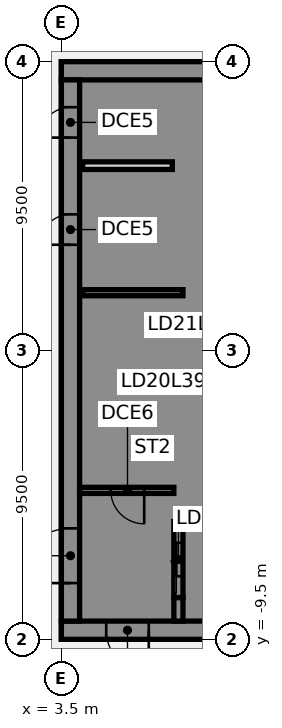
"""IFC4 building model, lengths in metres.
Left out: names, types, materials, properties, quantities, classifications, styles, units other than length and angle.
Written with IfcOpenShell. Run it as: python <this file> out.ifc"""

import sys

from ifc_helpers import new_model, si_unit, direction, frame, frame_2d, origin, place, context, subcontext, project, spatial, polyline, rectangle, outline, extrude, element, fill, save


model = new_model("IFC4")
c1 = context("Model", 3, precision=1e-05, world=origin(), true_north=direction((0.0, 1.0)))
c2 = subcontext(c1, "Body", "Model", "MODEL_VIEW")
j1 = project(units=[si_unit("LENGTHUNIT", "METRE"), si_unit("PLANEANGLEUNIT", "RADIAN")], contexts=[c1])
p1 = place(None, origin())
s1 = spatial("IfcSite", under=j1, at=p1, CompositionType="ELEMENT")
p2 = place(p1, origin())
s2 = spatial("IfcBuilding", under=s1, at=p2, CompositionType="ELEMENT")
p3 = place(p2, frame((0.0, 0.0, 159.25)))
s3 = spatial("IfcBuildingStorey", under=s2, at=p3, CompositionType="ELEMENT", Elevation=159.25)
p4 = place(p3, frame((16.5, -9.2, 0.0), z_axis=(0.0, 0.0, 1.0), x_axis=(-1.0, 0.0, 0.0)))
e1 = element("IfcWall", 1, at=p4, inside=s3, PredefinedType="SHEAR", context=c2, shape_type="SweptSolid", body=[
    extrude(rectangle(XDim=13.0, YDim=0.6, at=frame_2d((6.5, 0.0))), origin(), (0.0, 0.0, 1.0), 3.61),
])
p5 = place(p4, frame((4.15, 0.0, 0.0)))
e2 = element("IfcOpeningElement", 2, at=p5, cuts=e1, PredefinedType="OPENING", context=c2, shape_type="SweptSolid", body=[
    extrude(rectangle(XDim=1.4, YDim=2.1, at=frame_2d((0.7, 1.05))), frame((0.0, 0.31, 0.0), z_axis=(0.0, -1.0, 0.0), x_axis=(1.0, 0.0, 0.0)), (0.0, 0.0, 1.0), 0.62),
])
p6 = place(p4, frame((10.125, 0.0, 0.0)))
e3 = element("IfcOpeningElement", 3, at=p6, cuts=e1, PredefinedType="OPENING", context=c2, shape_type="SweptSolid", body=[
    extrude(rectangle(XDim=1.4, YDim=2.1, at=frame_2d((0.7, 1.05))), frame((0.0, 0.31, 0.0), z_axis=(0.0, -1.0, 0.0), x_axis=(1.0, 0.0, 0.0)), (0.0, 0.0, 1.0), 0.62),
])
p7 = place(p3, frame((16.5, 9.2, 0.0), z_axis=(0.0, 0.0, 1.0), x_axis=(-1.0, 0.0, 0.0)))
e4 = element("IfcWall", 4, at=p7, inside=s3, PredefinedType="SHEAR", context=c2, shape_type="SweptSolid", body=[
    extrude(rectangle(XDim=13.0, YDim=0.6, at=frame_2d((6.5, 0.0))), origin(), (0.0, 0.0, 1.0), 3.61),
])
p8 = place(p3, origin())
e5 = element("IfcWall", 5, at=p8, inside=s3, PredefinedType="SHEAR", context=c2, shape_type="SweptSolid", body=[
    extrude(outline(polyline([(9.8, -5.375), (7.5, -5.375), (7.5, -2.875), (9.8, -2.875), (9.8, -2.625), (7.5, -2.625), (7.5, -0.125), (9.8, -0.125), (9.8, 0.125), (7.5, 0.125), (7.5, 2.625), (9.8, 2.625), (9.8, 2.875), (7.5, 2.875), (7.5, 5.375), (9.8, 5.375), (9.8, 5.625), (7.5, 5.625), (7.5, 8.125), (9.8, 8.125), (9.8, 8.9), (7.5, 8.9), (7.2, 8.9), (7.2, -5.625), (7.5, -5.625), (9.8, -5.625), (9.8, -5.375)])), origin(), (0.0, 0.0, 1.0), 3.61),
])
p9 = place(p3, origin())
e6 = element("IfcWall", 6, at=p9, inside=s3, PredefinedType="SHEAR", context=c2, shape_type="SweptSolid", body=[
    extrude(outline(polyline([(7.5, -8.125), (7.5, -8.9), (9.8, -8.9), (9.8, -8.125), (9.8, -5.625), (9.55, -5.625), (9.55, -8.125), (7.5, -8.125)])), origin(), (0.0, 0.0, 1.0), 3.61),
])
p10 = place(p3, frame((7.35, -8.9, 0.0), z_axis=(0.0, 0.0, 1.0), x_axis=(0.0, 1.0, 0.0)))
e7 = element("IfcWall", 7, at=p10, inside=s3, PredefinedType="SHEAR", context=c2, shape_type="SweptSolid", body=[
    extrude(rectangle(XDim=0.775, YDim=0.3, at=frame_2d((0.387, 0.0))), origin(), (0.0, 0.0, 1.0), 3.61),
])
p11 = place(p3, frame((7.5, 1.9, 0.0), z_axis=(0.0, 0.0, 1.0), x_axis=(-1.0, 0.0, 0.0)))
e8 = element("IfcWall", 8, at=p11, inside=s3, PredefinedType="SHEAR", context=c2, shape_type="SweptSolid", body=[
    extrude(rectangle(XDim=3.3, YDim=0.2, at=frame_2d((1.65, 0.0))), origin(), (0.0, 0.0, 1.0), 3.61),
])
p12 = place(p3, frame((7.35, -8.125, 0.0), z_axis=(0.0, 0.0, 1.0), x_axis=(0.0, 1.0, 0.0)))
e9 = element("IfcWall", 9, at=p12, inside=s3, PredefinedType="SHEAR", context=c2, shape_type="SweptSolid", body=[
    extrude(rectangle(XDim=2.5, YDim=0.3, at=frame_2d((1.25, 0.0))), origin(), (0.0, 0.0, 1.0), 3.61),
])
p13 = place(p12, frame((0.7, 0.0, 0.0)))
e10 = element("IfcOpeningElement", 10, at=p13, cuts=e9, PredefinedType="OPENING", context=c2, shape_type="SweptSolid", body=[
    extrude(rectangle(XDim=1.1, YDim=2.1, at=frame_2d((0.55, 1.05))), frame((0.0, 0.16, 0.0), z_axis=(0.0, -1.0, 0.0), x_axis=(1.0, 0.0, 0.0)), (0.0, 0.0, 1.0), 0.32),
])
p14 = place(p3, frame((3.8, -8.9, 0.0), z_axis=(0.0, 0.0, 1.0), x_axis=(0.0, 1.0, 0.0)))
e11 = element("IfcWall", 11, at=p14, inside=s3, PredefinedType="SHEAR", context=c2, shape_type="SweptSolid", body=[
    extrude(rectangle(XDim=17.8, YDim=0.6, at=frame_2d((8.9, 0.0))), origin(), (0.0, 0.0, 1.0), 3.61),
])
p15 = place(p14, frame((1.25, 0.0, 0.0)))
e12 = element("IfcOpeningElement", 12, at=p15, cuts=e11, PredefinedType="OPENING", context=c2, shape_type="SweptSolid", body=[
    extrude(rectangle(XDim=1.8, YDim=2.1, at=frame_2d((0.9, 1.05))), frame((0.0, 0.31, 0.0), z_axis=(0.0, -1.0, 0.0), x_axis=(1.0, 0.0, 0.0)), (0.0, 0.0, 1.0), 0.62),
])
p16 = place(p14, frame((12.377, 0.0, 0.0)))
e13 = element("IfcOpeningElement", 13, at=p16, cuts=e11, PredefinedType="OPENING", context=c2, shape_type="SweptSolid", body=[
    extrude(rectangle(XDim=1.0, YDim=2.1, at=frame_2d((0.5, 1.05))), frame((0.0, 0.31, 0.0), z_axis=(0.0, -1.0, 0.0), x_axis=(1.0, 0.0, 0.0)), (0.0, 0.0, 1.0), 0.62),
])
p17 = place(p14, frame((15.903, 0.0, 0.0)))
e14 = element("IfcOpeningElement", 14, at=p17, cuts=e11, PredefinedType="OPENING", context=c2, shape_type="SweptSolid", body=[
    extrude(rectangle(XDim=1.0, YDim=2.1, at=frame_2d((0.5, 1.05))), frame((0.0, 0.31, 0.0), z_axis=(0.0, -1.0, 0.0), x_axis=(1.0, 0.0, 0.0)), (0.0, 0.0, 1.0), 0.62),
])
p18 = place(p3, frame((7.15, 6.08, 0.0), z_axis=(0.0, 0.0, 1.0), x_axis=(-1.0, 0.0, 0.0)))
e15 = element("IfcWall", 15, at=p18, inside=s3, PredefinedType="PARTITIONING", context=c2, shape_type="SweptSolid", body=[
    extrude(rectangle(XDim=2.95, YDim=0.25, at=frame_2d((1.475, 0.0))), origin(), (0.0, 0.0, 1.0), 3.61),
])
p19 = place(p3, frame((7.2, -4.6, 0.0), z_axis=(0.0, 0.0, 1.0), x_axis=(-1.0, 0.0, 0.0)))
e16 = element("IfcWall", 16, at=p19, inside=s3, PredefinedType="SHEAR", context=c2, shape_type="SweptSolid", body=[
    extrude(rectangle(XDim=3.1, YDim=0.2, at=frame_2d((1.55, 0.0))), origin(), (0.0, 0.0, 1.0), 3.61),
])
p20 = place(p19, frame((0.975, 0.0, 0.0)))
e17 = element("IfcOpeningElement", 17, at=p20, cuts=e16, PredefinedType="OPENING", context=c2, shape_type="SweptSolid", body=[
    extrude(rectangle(XDim=1.1, YDim=2.1, at=frame_2d((0.55, 1.05))), frame((0.0, 0.11, 0.0), z_axis=(0.0, -1.0, 0.0), x_axis=(1.0, 0.0, 0.0)), (0.0, 0.0, 1.0), 0.22),
])
p21 = place(p6, origin())
e18 = element("IfcDoor", 18, at=p21, inside=s3, OperationType="SINGLE_SWING_LEFT", PredefinedType="DOOR", context=c2, shape_type="SweptSolid", body=[
    extrude(rectangle(XDim=1.4, YDim=2.1, at=frame_2d((0.7, 1.05))), frame((0.0, 0.025, 0.0), z_axis=(0.0, -1.0, 0.0), x_axis=(1.0, 0.0, 0.0)), (0.0, 0.0, 1.0), 0.05),
])
fill(e3, e18)
p22 = place(p15, origin())
e19 = element("IfcDoor", 19, at=p22, inside=s3, OperationType="SINGLE_SWING_LEFT", PredefinedType="DOOR", context=c2, shape_type="SweptSolid", body=[
    extrude(rectangle(XDim=1.8, YDim=2.1, at=frame_2d((0.9, 1.05))), frame((0.0, 0.025, 0.0), z_axis=(0.0, -1.0, 0.0), x_axis=(1.0, 0.0, 0.0)), (0.0, 0.0, 1.0), 0.05),
])
fill(e12, e19)
p23 = place(p16, origin())
e20 = element("IfcDoor", 20, at=p23, inside=s3, OperationType="SINGLE_SWING_LEFT", PredefinedType="DOOR", context=c2, shape_type="SweptSolid", body=[
    extrude(rectangle(XDim=1.0, YDim=2.1, at=frame_2d((0.5, 1.05))), frame((0.0, -0.225, 0.0), z_axis=(0.0, -1.0, 0.0), x_axis=(1.0, 0.0, 0.0)), (0.0, 0.0, 1.0), 0.05),
])
fill(e13, e20)
p24 = place(p17, origin())
e21 = element("IfcDoor", 21, at=p24, inside=s3, OperationType="SINGLE_SWING_LEFT", PredefinedType="DOOR", context=c2, shape_type="SweptSolid", body=[
    extrude(rectangle(XDim=1.0, YDim=2.1, at=frame_2d((0.5, 1.05))), frame((0.0, -0.225, 0.0), z_axis=(0.0, -1.0, 0.0), x_axis=(1.0, 0.0, 0.0)), (0.0, 0.0, 1.0), 0.05),
])
fill(e14, e21)
p25 = place(p20, origin())
e22 = element("IfcDoor", 22, at=p25, inside=s3, OperationType="SINGLE_SWING_LEFT", PredefinedType="DOOR", context=c2, shape_type="SweptSolid", body=[
    extrude(rectangle(XDim=1.1, YDim=2.1, at=frame_2d((0.55, 1.05))), frame((0.0, 0.025, 0.0), z_axis=(0.0, -1.0, 0.0), x_axis=(1.0, 0.0, 0.0)), (0.0, 0.0, 1.0), 0.05),
])
fill(e17, e22)
p26 = place(p13, origin())
e23 = element("IfcDoor", 23, at=p26, inside=s3, OperationType="SLIDING_TO_LEFT", PredefinedType="DOOR", context=c2, shape_type="SweptSolid", body=[
    extrude(rectangle(XDim=1.1, YDim=2.1, at=frame_2d((0.55, 1.05))), frame((0.0, 0.025, 0.0), z_axis=(0.0, -1.0, 0.0), x_axis=(1.0, 0.0, 0.0)), (0.0, 0.0, 1.0), 0.05),
])
fill(e10, e23)
save(model, sys.argv[1])
